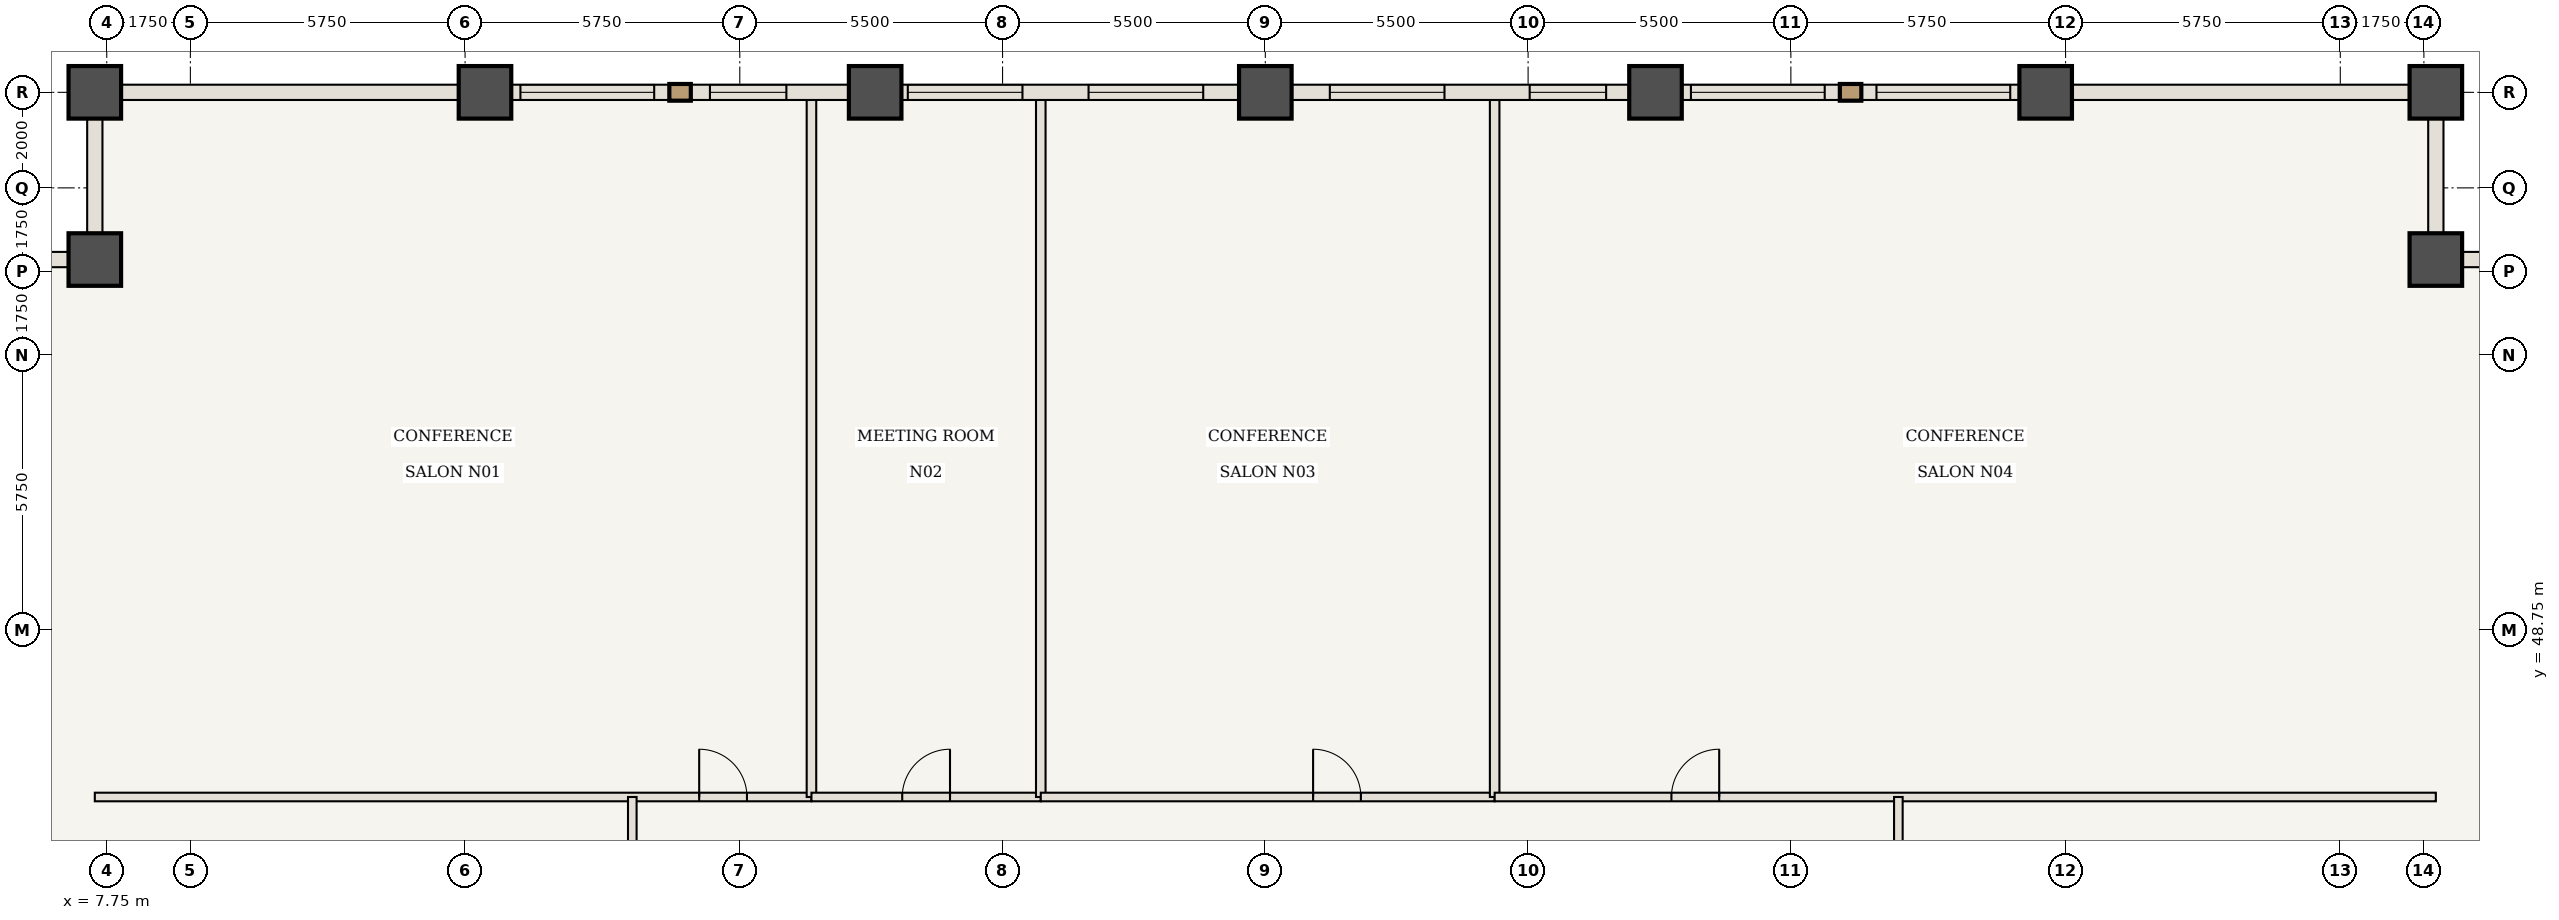
"""IFC4 building model, lengths in metres.
Left out: names, types, materials, properties, quantities, classifications, styles, units other than length and angle.
Written with IfcOpenShell. Run it as: python <this file> out.ifc"""

import sys

from ifc_helpers import new_model, si_unit, direction, frame, frame_2d, origin, origin_2d, place, context, subcontext, project, spatial, rectangle, extrude, element, fill, save


model = new_model("IFC4")
c1 = context("Model", 3, precision=1e-05, world=origin(), true_north=direction((0.0, 1.0)))
c2 = subcontext(c1, "Body", "Model", "MODEL_VIEW")
j1 = project(units=[si_unit("LENGTHUNIT", "METRE"), si_unit("PLANEANGLEUNIT", "RADIAN")], contexts=[c1])
p1 = place(None, origin())
s1 = spatial("IfcSite", under=j1, at=p1, CompositionType="ELEMENT")
p2 = place(p1, origin())
s2 = spatial("IfcBuilding", under=s1, at=p2, CompositionType="ELEMENT")
p3 = place(p2, frame((0.0, 0.0, 82.25)))
s3 = spatial("IfcBuildingStorey", under=s2, at=p3, CompositionType="ELEMENT", Elevation=82.25)
for number, where, z_axis, x_axis in (
    (1, (56.5, 56.5, 0.0), (0.0, 0.0, 1.0), (1.0, 0.0, 0.0)),
    (2, (56.5, 60.0, 0.0), (0.0, 0.0, 1.0), (1.0, 0.0, 0.0)),
    (3, (7.5, 60.0, 0.0), (0.0, 0.0, 1.0), (1.0, 0.0, 0.0)),
    (4, (7.5, 56.5, 0.0), (0.0, 0.0, 1.0), (1.0, 0.0, 0.0)),
    (5, (15.667, 60.0, 0.0), (0.0, 0.0, 1.0), (1.0, 0.0, 0.0)),
    (6, (23.833, 60.0, 0.0), (0.0, 0.0, 1.0), (1.0, 0.0, 0.0)),
    (7, (32.0, 60.0, 0.0), (0.0, 0.0, 1.0), (1.0, 0.0, 0.0)),
    (8, (40.167, 60.0, 0.0), (0.0, 0.0, 1.0), (1.0, 0.0, 0.0)),
    (9, (48.333, 60.0, 0.0), (0.0, 0.0, 1.0), (1.0, 0.0, 0.0)),
):
    element("IfcColumn", number, at=place(p3, frame(where, z_axis=z_axis, x_axis=x_axis)), inside=s3, PredefinedType="COLUMN", context=c2, shape_type="SweptSolid", body=[
        extrude(rectangle(XDim=1.1, YDim=1.1, at=origin_2d()), origin(), (0.0, 0.0, 1.0), 3.5),
    ])
p4 = place(p3, frame((7.5, 45.25, 0.0), z_axis=(0.0, 0.0, 1.0), x_axis=(1.0, 0.0, 0.0)))
e10 = element("IfcWall", 10, at=p4, inside=s3, PredefinedType="STANDARD", context=c2, shape_type="SweptSolid", body=[
    extrude(rectangle(XDim=15.0, YDim=0.18, at=frame_2d((7.5, 0.0))), origin(), (0.0, 0.0, 1.0), 3.32),
])
p5 = place(p4, frame((12.65, 0.0, 0.0)))
e11 = element("IfcOpeningElement", 11, at=p5, cuts=e10, PredefinedType="OPENING", context=c2, shape_type="SweptSolid", body=[
    extrude(rectangle(XDim=1.0, YDim=2.15, at=frame_2d((0.5, 1.075))), frame((0.0, 0.1, 0.0), z_axis=(0.0, -1.0, 0.0), x_axis=(1.0, 0.0, 0.0)), (0.0, 0.0, 1.0), 0.2),
])
p6 = place(p3, frame((22.5, 45.25, 0.0), z_axis=(0.0, 0.0, 1.0), x_axis=(0.0, 1.0, 0.0)))
e12 = element("IfcWall", 12, at=p6, inside=s3, PredefinedType="STANDARD", context=c2, shape_type="SweptSolid", body=[
    extrude(rectangle(XDim=14.69, YDim=0.2, at=frame_2d((7.345, 0.0))), origin(), (0.0, 0.0, 1.0), 3.32),
])
p7 = place(p3, frame((22.5, 45.25, 0.0), z_axis=(0.0, 0.0, 1.0), x_axis=(1.0, 0.0, 0.0)))
e13 = element("IfcWall", 13, at=p7, inside=s3, PredefinedType="STANDARD", context=c2, shape_type="SweptSolid", body=[
    extrude(rectangle(XDim=4.8, YDim=0.18, at=frame_2d((2.4, 0.0))), origin(), (0.0, 0.0, 1.0), 3.32),
])
p8 = place(p7, frame((1.9, 0.0, 0.0)))
e14 = element("IfcOpeningElement", 14, at=p8, cuts=e13, PredefinedType="OPENING", context=c2, shape_type="SweptSolid", body=[
    extrude(rectangle(XDim=1.0, YDim=2.15, at=frame_2d((0.5, 1.075))), frame((0.0, 0.1, 0.0), z_axis=(0.0, -1.0, 0.0), x_axis=(1.0, 0.0, 0.0)), (0.0, 0.0, 1.0), 0.2),
])
p9 = place(p3, frame((27.3, 45.25, 0.0), z_axis=(0.0, 0.0, 1.0), x_axis=(0.0, 1.0, 0.0)))
e15 = element("IfcWall", 15, at=p9, inside=s3, PredefinedType="STANDARD", context=c2, shape_type="SweptSolid", body=[
    extrude(rectangle(XDim=14.69, YDim=0.2, at=frame_2d((7.345, 0.0))), origin(), (0.0, 0.0, 1.0), 3.32),
])
p10 = place(p3, frame((27.3, 45.25, 0.0), z_axis=(0.0, 0.0, 1.0), x_axis=(1.0, 0.0, 0.0)))
e16 = element("IfcWall", 16, at=p10, inside=s3, PredefinedType="STANDARD", context=c2, shape_type="SweptSolid", body=[
    extrude(rectangle(XDim=9.5, YDim=0.18, at=frame_2d((4.75, 0.0))), origin(), (0.0, 0.0, 1.0), 3.32),
])
p11 = place(p10, frame((5.7, 0.0, 0.0)))
e17 = element("IfcOpeningElement", 17, at=p11, cuts=e16, PredefinedType="OPENING", context=c2, shape_type="SweptSolid", body=[
    extrude(rectangle(XDim=1.0, YDim=2.15, at=frame_2d((0.5, 1.075))), frame((0.0, 0.1, 0.0), z_axis=(0.0, -1.0, 0.0), x_axis=(1.0, 0.0, 0.0)), (0.0, 0.0, 1.0), 0.2),
])
p12 = place(p3, frame((36.8, 45.25, 0.0), z_axis=(0.0, 0.0, 1.0), x_axis=(0.0, 1.0, 0.0)))
e18 = element("IfcWall", 18, at=p12, inside=s3, PredefinedType="STANDARD", context=c2, shape_type="SweptSolid", body=[
    extrude(rectangle(XDim=14.69, YDim=0.2, at=frame_2d((7.345, 0.0))), origin(), (0.0, 0.0, 1.0), 3.32),
])
p13 = place(p3, frame((36.8, 45.25, 0.0), z_axis=(0.0, 0.0, 1.0), x_axis=(1.0, 0.0, 0.0)))
e19 = element("IfcWall", 19, at=p13, inside=s3, PredefinedType="STANDARD", context=c2, shape_type="SweptSolid", body=[
    extrude(rectangle(XDim=19.7, YDim=0.18, at=frame_2d((9.85, 0.0))), origin(), (0.0, 0.0, 1.0), 3.32),
])
p14 = place(p13, frame((3.7, 0.0, 0.0)))
e20 = element("IfcOpeningElement", 20, at=p14, cuts=e19, PredefinedType="OPENING", context=c2, shape_type="SweptSolid", body=[
    extrude(rectangle(XDim=1.0, YDim=2.15, at=frame_2d((0.5, 1.075))), frame((0.0, 0.1, 0.0), z_axis=(0.0, -1.0, 0.0), x_axis=(1.0, 0.0, 0.0)), (0.0, 0.0, 1.0), 0.2),
])
p15 = place(p3, frame((18.75, 37.8, 0.0), z_axis=(0.0, 0.0, 1.0), x_axis=(0.0, 1.0, 0.0)))
e21 = element("IfcWall", 21, at=p15, inside=s3, PredefinedType="STANDARD", context=c2, shape_type="SweptSolid", body=[
    extrude(rectangle(XDim=7.45, YDim=0.18, at=frame_2d((3.725, 0.0))), origin(), (0.0, 0.0, 1.0), 3.32),
])
p16 = place(p15, frame((3.225, 0.0, 0.0)))
e22 = element("IfcOpeningElement", 22, at=p16, cuts=e21, PredefinedType="OPENING", context=c2, shape_type="SweptSolid", body=[
    extrude(rectangle(XDim=1.0, YDim=2.15, at=frame_2d((0.5, 1.075))), frame((0.0, 0.1, 0.0), z_axis=(0.0, -1.0, 0.0), x_axis=(1.0, 0.0, 0.0)), (0.0, 0.0, 1.0), 0.2),
])
p17 = place(p3, frame((45.25, 31.0, 0.0), z_axis=(0.0, 0.0, 1.0), x_axis=(0.0, 1.0, 0.0)))
e23 = element("IfcWall", 23, at=p17, inside=s3, PredefinedType="STANDARD", context=c2, shape_type="SweptSolid", body=[
    extrude(rectangle(XDim=14.25, YDim=0.18, at=frame_2d((7.125, 0.0))), origin(), (0.0, 0.0, 1.0), 3.32),
])
p18 = place(p17, frame((6.625, 0.0, 0.0)))
e24 = element("IfcOpeningElement", 24, at=p18, cuts=e23, PredefinedType="OPENING", context=c2, shape_type="SweptSolid", body=[
    extrude(rectangle(XDim=1.0, YDim=2.15, at=frame_2d((0.5, 1.075))), frame((0.0, 0.1, 0.0), z_axis=(0.0, -1.0, 0.0), x_axis=(1.0, 0.0, 0.0)), (0.0, 0.0, 1.0), 0.2),
])
p19 = place(p3, frame((7.5, 60.0, 0.0), z_axis=(0.0, 0.0, 1.0), x_axis=(1.0, 0.0, 0.0)))
e25 = element("IfcWall", 25, at=p19, inside=s3, PredefinedType="USERDEFINED", context=c2, shape_type="SweptSolid", body=[
    extrude(rectangle(XDim=8.167, YDim=0.32, at=frame_2d((4.083, 0.0))), origin(), (0.0, 0.0, 1.0), 2.52),
])
p20 = place(p3, frame((15.667, 60.0, 0.0), z_axis=(0.0, 0.0, 1.0), x_axis=(1.0, 0.0, 0.0)))
e26 = element("IfcWall", 26, at=p20, inside=s3, PredefinedType="USERDEFINED", context=c2, shape_type="SweptSolid", body=[
    extrude(rectangle(XDim=8.167, YDim=0.32, at=frame_2d((4.083, 0.0))), origin(), (0.0, 0.0, 1.0), 2.52),
])
p21 = place(p20, frame((0.742, 0.0, 0.85)))
e27 = element("IfcOpeningElement", 27, at=p21, cuts=e26, PredefinedType="OPENING", context=c2, shape_type="SweptSolid", body=[
    extrude(rectangle(XDim=2.8, YDim=1.47, at=frame_2d((1.4, 0.735))), frame((0.0, 0.17, 0.0), z_axis=(0.0, -1.0, 0.0), x_axis=(1.0, 0.0, 0.0)), (0.0, 0.0, 1.0), 0.34),
])
p22 = place(p20, frame((4.708, 0.0, 0.85)))
e28 = element("IfcOpeningElement", 28, at=p22, cuts=e26, PredefinedType="OPENING", context=c2, shape_type="SweptSolid", body=[
    extrude(rectangle(XDim=1.6, YDim=1.47, at=frame_2d((0.8, 0.735))), frame((0.0, 0.17, 0.0), z_axis=(0.0, -1.0, 0.0), x_axis=(1.0, 0.0, 0.0)), (0.0, 0.0, 1.0), 0.34),
])
p23 = place(p3, frame((23.833, 60.0, 0.0), z_axis=(0.0, 0.0, 1.0), x_axis=(1.0, 0.0, 0.0)))
e29 = element("IfcWall", 29, at=p23, inside=s3, PredefinedType="USERDEFINED", context=c2, shape_type="SweptSolid", body=[
    extrude(rectangle(XDim=8.167, YDim=0.32, at=frame_2d((4.083, 0.0))), origin(), (0.0, 0.0, 1.0), 2.52),
])
p24 = place(p23, frame((0.683, 0.0, 0.85)))
e30 = element("IfcOpeningElement", 30, at=p24, cuts=e29, PredefinedType="OPENING", context=c2, shape_type="SweptSolid", body=[
    extrude(rectangle(XDim=2.4, YDim=1.47, at=frame_2d((1.2, 0.735))), frame((0.0, 0.17, 0.0), z_axis=(0.0, -1.0, 0.0), x_axis=(1.0, 0.0, 0.0)), (0.0, 0.0, 1.0), 0.34),
])
p25 = place(p23, frame((4.467, 0.0, 0.85)))
e31 = element("IfcOpeningElement", 31, at=p25, cuts=e29, PredefinedType="OPENING", context=c2, shape_type="SweptSolid", body=[
    extrude(rectangle(XDim=2.4, YDim=1.47, at=frame_2d((1.2, 0.735))), frame((0.0, 0.17, 0.0), z_axis=(0.0, -1.0, 0.0), x_axis=(1.0, 0.0, 0.0)), (0.0, 0.0, 1.0), 0.34),
])
p26 = place(p3, frame((32.0, 60.0, 0.0), z_axis=(0.0, 0.0, 1.0), x_axis=(1.0, 0.0, 0.0)))
e32 = element("IfcWall", 32, at=p26, inside=s3, PredefinedType="USERDEFINED", context=c2, shape_type="SweptSolid", body=[
    extrude(rectangle(XDim=8.167, YDim=0.32, at=frame_2d((4.083, 0.0))), origin(), (0.0, 0.0, 1.0), 2.52),
])
p27 = place(p26, frame((1.35, 0.0, 0.85)))
e33 = element("IfcOpeningElement", 33, at=p27, cuts=e32, PredefinedType="OPENING", context=c2, shape_type="SweptSolid", body=[
    extrude(rectangle(XDim=2.4, YDim=1.47, at=frame_2d((1.2, 0.735))), frame((0.0, 0.17, 0.0), z_axis=(0.0, -1.0, 0.0), x_axis=(1.0, 0.0, 0.0)), (0.0, 0.0, 1.0), 0.34),
])
p28 = place(p26, frame((5.533, 0.0, 0.85)))
e34 = element("IfcOpeningElement", 34, at=p28, cuts=e32, PredefinedType="OPENING", context=c2, shape_type="SweptSolid", body=[
    extrude(rectangle(XDim=1.6, YDim=1.47, at=frame_2d((0.8, 0.735))), frame((0.0, 0.17, 0.0), z_axis=(0.0, -1.0, 0.0), x_axis=(1.0, 0.0, 0.0)), (0.0, 0.0, 1.0), 0.34),
])
p29 = place(p3, frame((40.167, 60.0, 0.0), z_axis=(0.0, 0.0, 1.0), x_axis=(1.0, 0.0, 0.0)))
e35 = element("IfcWall", 35, at=p29, inside=s3, PredefinedType="USERDEFINED", context=c2, shape_type="SweptSolid", body=[
    extrude(rectangle(XDim=8.167, YDim=0.32, at=frame_2d((4.083, 0.0))), origin(), (0.0, 0.0, 1.0), 2.52),
])
p30 = place(p29, frame((0.742, 0.0, 0.85)))
e36 = element("IfcOpeningElement", 36, at=p30, cuts=e35, PredefinedType="OPENING", context=c2, shape_type="SweptSolid", body=[
    extrude(rectangle(XDim=2.8, YDim=1.47, at=frame_2d((1.4, 0.735))), frame((0.0, 0.17, 0.0), z_axis=(0.0, -1.0, 0.0), x_axis=(1.0, 0.0, 0.0)), (0.0, 0.0, 1.0), 0.34),
])
p31 = place(p29, frame((4.625, 0.0, 0.85)))
e37 = element("IfcOpeningElement", 37, at=p31, cuts=e35, PredefinedType="OPENING", context=c2, shape_type="SweptSolid", body=[
    extrude(rectangle(XDim=2.8, YDim=1.47, at=frame_2d((1.4, 0.735))), frame((0.0, 0.17, 0.0), z_axis=(0.0, -1.0, 0.0), x_axis=(1.0, 0.0, 0.0)), (0.0, 0.0, 1.0), 0.34),
])
p32 = place(p3, frame((48.333, 60.0, 0.0), z_axis=(0.0, 0.0, 1.0), x_axis=(1.0, 0.0, 0.0)))
e38 = element("IfcWall", 38, at=p32, inside=s3, PredefinedType="USERDEFINED", context=c2, shape_type="SweptSolid", body=[
    extrude(rectangle(XDim=8.167, YDim=0.32, at=frame_2d((4.083, 0.0))), origin(), (0.0, 0.0, 1.0), 2.52),
])
for number, where, z_axis, x_axis in (
    (39, (56.5, 56.5, 0.0), (0.0, 0.0, 1.0), (1.0, 0.0, 0.0)),
    (40, (56.5, 60.0, 0.0), (0.0, 0.0, 1.0), (0.0, -1.0, 0.0)),
    (41, (7.5, 56.5, 0.0), (0.0, 0.0, 1.0), (0.0, 1.0, 0.0)),
    (42, (4.0, 56.5, 0.0), (0.0, 0.0, 1.0), (1.0, 0.0, 0.0)),
):
    element("IfcWall", number, at=place(p3, frame(where, z_axis=z_axis, x_axis=x_axis)), inside=s3, PredefinedType="USERDEFINED", context=c2, shape_type="SweptSolid", body=[
        extrude(rectangle(XDim=3.5, YDim=0.32, at=frame_2d((1.75, 0.0))), origin(), (0.0, 0.0, 1.0), 2.52),
    ])
p33 = place(p5, origin())
e43 = element("IfcDoor", 43, at=p33, inside=s3, OperationType="SINGLE_SWING_LEFT", PredefinedType="DOOR", context=c2, shape_type="SweptSolid", body=[
    extrude(rectangle(XDim=1.0, YDim=2.15, at=frame_2d((0.5, 1.075))), frame((0.0, 0.025, 0.0), z_axis=(0.0, -1.0, 0.0), x_axis=(1.0, 0.0, 0.0)), (0.0, 0.0, 1.0), 0.05),
])
fill(e11, e43)
p34 = place(p8, origin())
e44 = element("IfcDoor", 44, at=p34, inside=s3, OperationType="SINGLE_SWING_RIGHT", PredefinedType="DOOR", context=c2, shape_type="SweptSolid", body=[
    extrude(rectangle(XDim=1.0, YDim=2.15, at=frame_2d((0.5, 1.075))), frame((0.0, 0.025, 0.0), z_axis=(0.0, -1.0, 0.0), x_axis=(1.0, 0.0, 0.0)), (0.0, 0.0, 1.0), 0.05),
])
fill(e14, e44)
p35 = place(p11, origin())
e45 = element("IfcDoor", 45, at=p35, inside=s3, OperationType="SINGLE_SWING_LEFT", PredefinedType="DOOR", context=c2, shape_type="SweptSolid", body=[
    extrude(rectangle(XDim=1.0, YDim=2.15, at=frame_2d((0.5, 1.075))), frame((0.0, 0.025, 0.0), z_axis=(0.0, -1.0, 0.0), x_axis=(1.0, 0.0, 0.0)), (0.0, 0.0, 1.0), 0.05),
])
fill(e17, e45)
p36 = place(p14, origin())
e46 = element("IfcDoor", 46, at=p36, inside=s3, OperationType="SINGLE_SWING_RIGHT", PredefinedType="DOOR", context=c2, shape_type="SweptSolid", body=[
    extrude(rectangle(XDim=1.0, YDim=2.15, at=frame_2d((0.5, 1.075))), frame((0.0, 0.025, 0.0), z_axis=(0.0, -1.0, 0.0), x_axis=(1.0, 0.0, 0.0)), (0.0, 0.0, 1.0), 0.05),
])
fill(e20, e46)
p37 = place(p21, origin())
e47 = element("IfcWindow", 47, at=p37, inside=s3, PartitioningType="SINGLE_PANEL", PredefinedType="WINDOW", context=c2, shape_type="SweptSolid", body=[
    extrude(rectangle(XDim=2.8, YDim=1.47, at=frame_2d((1.4, 0.735))), frame((0.0, 0.03, 0.0), z_axis=(0.0, -1.0, 0.0), x_axis=(1.0, 0.0, 0.0)), (0.0, 0.0, 1.0), 0.06),
])
fill(e27, e47)
p38 = place(p22, origin())
e48 = element("IfcWindow", 48, at=p38, inside=s3, PartitioningType="SINGLE_PANEL", PredefinedType="WINDOW", context=c2, shape_type="SweptSolid", body=[
    extrude(rectangle(XDim=1.6, YDim=1.47, at=frame_2d((0.8, 0.735))), frame((0.0, 0.03, 0.0), z_axis=(0.0, -1.0, 0.0), x_axis=(1.0, 0.0, 0.0)), (0.0, 0.0, 1.0), 0.06),
])
fill(e28, e48)
p39 = place(p24, origin())
e49 = element("IfcWindow", 49, at=p39, inside=s3, PartitioningType="SINGLE_PANEL", PredefinedType="WINDOW", context=c2, shape_type="SweptSolid", body=[
    extrude(rectangle(XDim=2.4, YDim=1.47, at=frame_2d((1.2, 0.735))), frame((0.0, 0.03, 0.0), z_axis=(0.0, -1.0, 0.0), x_axis=(1.0, 0.0, 0.0)), (0.0, 0.0, 1.0), 0.06),
])
fill(e30, e49)
p40 = place(p25, origin())
e50 = element("IfcWindow", 50, at=p40, inside=s3, PartitioningType="SINGLE_PANEL", PredefinedType="WINDOW", context=c2, shape_type="SweptSolid", body=[
    extrude(rectangle(XDim=2.4, YDim=1.47, at=frame_2d((1.2, 0.735))), frame((0.0, 0.03, 0.0), z_axis=(0.0, -1.0, 0.0), x_axis=(1.0, 0.0, 0.0)), (0.0, 0.0, 1.0), 0.06),
])
fill(e31, e50)
p41 = place(p27, origin())
e51 = element("IfcWindow", 51, at=p41, inside=s3, PartitioningType="SINGLE_PANEL", PredefinedType="WINDOW", context=c2, shape_type="SweptSolid", body=[
    extrude(rectangle(XDim=2.4, YDim=1.47, at=frame_2d((1.2, 0.735))), frame((0.0, 0.03, 0.0), z_axis=(0.0, -1.0, 0.0), x_axis=(1.0, 0.0, 0.0)), (0.0, 0.0, 1.0), 0.06),
])
fill(e33, e51)
p42 = place(p28, origin())
e52 = element("IfcWindow", 52, at=p42, inside=s3, PartitioningType="SINGLE_PANEL", PredefinedType="WINDOW", context=c2, shape_type="SweptSolid", body=[
    extrude(rectangle(XDim=1.6, YDim=1.47, at=frame_2d((0.8, 0.735))), frame((0.0, 0.03, 0.0), z_axis=(0.0, -1.0, 0.0), x_axis=(1.0, 0.0, 0.0)), (0.0, 0.0, 1.0), 0.06),
])
fill(e34, e52)
p43 = place(p30, origin())
e53 = element("IfcWindow", 53, at=p43, inside=s3, PartitioningType="SINGLE_PANEL", PredefinedType="WINDOW", context=c2, shape_type="SweptSolid", body=[
    extrude(rectangle(XDim=2.8, YDim=1.47, at=frame_2d((1.4, 0.735))), frame((0.0, 0.03, 0.0), z_axis=(0.0, -1.0, 0.0), x_axis=(1.0, 0.0, 0.0)), (0.0, 0.0, 1.0), 0.06),
])
fill(e36, e53)
p44 = place(p31, origin())
e54 = element("IfcWindow", 54, at=p44, inside=s3, PartitioningType="SINGLE_PANEL", PredefinedType="WINDOW", context=c2, shape_type="SweptSolid", body=[
    extrude(rectangle(XDim=2.8, YDim=1.47, at=frame_2d((1.4, 0.735))), frame((0.0, 0.03, 0.0), z_axis=(0.0, -1.0, 0.0), x_axis=(1.0, 0.0, 0.0)), (0.0, 0.0, 1.0), 0.06),
])
fill(e37, e54)
save(model, sys.argv[1])
